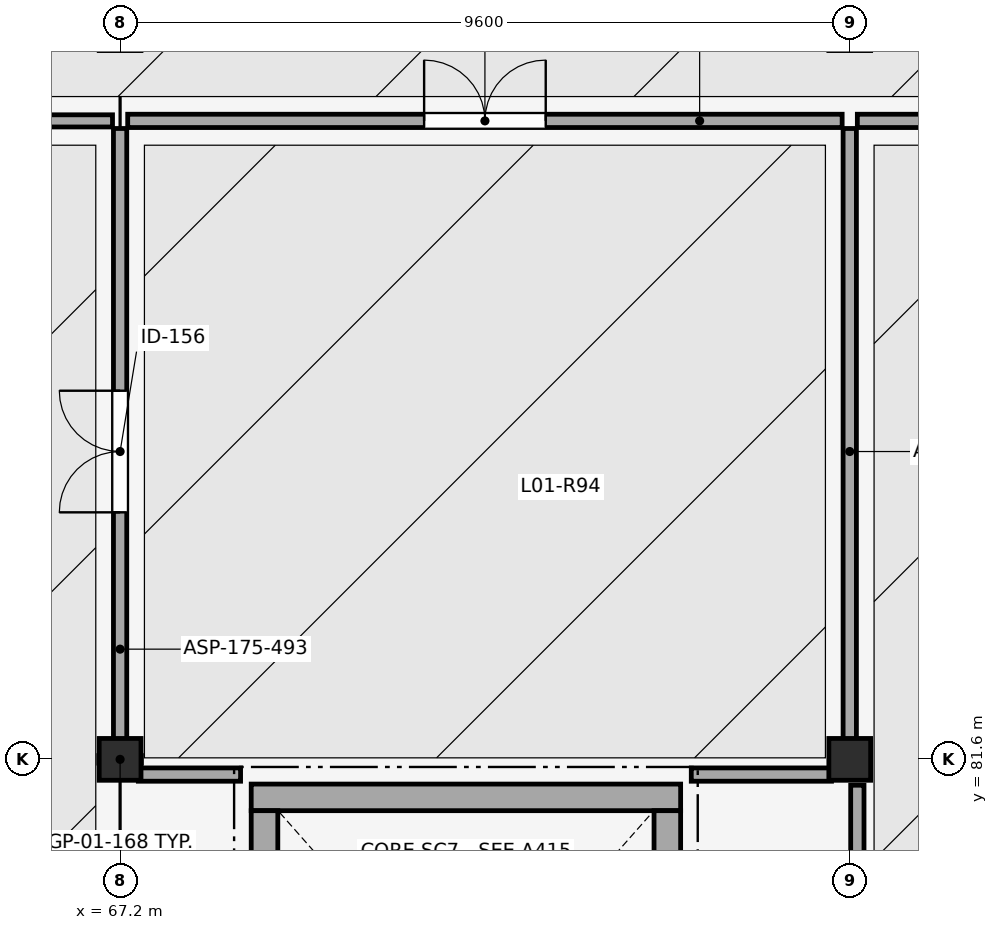
"""IFC4 building model, lengths in metres.
Left out: names, types, materials, properties, quantities, classifications, styles, units other than length and angle.
Written with IfcOpenShell. Run it as: python <this file> out.ifc"""

import sys

from ifc_helpers import new_model, si_unit, direction, frame, frame_2d, origin, origin_2d, place, context, subcontext, project, spatial, rectangle, extrude, element, fill, save


model = new_model("IFC4")
c1 = context("Model", 3, precision=1e-05, world=origin(), true_north=direction((0.0, 1.0)))
c2 = subcontext(c1, "Body", "Model", "MODEL_VIEW")
j1 = project(units=[si_unit("LENGTHUNIT", "METRE"), si_unit("PLANEANGLEUNIT", "RADIAN")], contexts=[c1])
p1 = place(None, origin())
s1 = spatial("IfcSite", under=j1, at=p1, CompositionType="ELEMENT")
p2 = place(p1, origin())
s2 = spatial("IfcBuilding", under=s1, at=p2, CompositionType="ELEMENT")
p3 = place(p2, frame((0.0, 0.0, 4.8)))
s3 = spatial("IfcBuildingStorey", under=s2, at=p3, CompositionType="ELEMENT", Elevation=4.8)
for number, where, z_axis, x_axis in (
    (1, (67.2, 81.6, 0.0), (0.0, 0.0, 1.0), (1.0, 0.0, 0.0)),
    (2, (76.8, 81.6, 0.0), (0.0, 0.0, 1.0), (1.0, 0.0, 0.0)),
):
    element("IfcColumn", number, at=place(p3, frame(where, z_axis=z_axis, x_axis=x_axis)), inside=s3, PredefinedType="COLUMN", context=c2, shape_type="SweptSolid", body=[
        extrude(rectangle(XDim=0.55, YDim=0.55, at=origin_2d()), origin(), (0.0, 0.0, 1.0), 4.8),
    ])
p4 = place(p3, frame((68.925, 81.1, 0.0), z_axis=(0.0, 0.0, 1.0), x_axis=(1.0, 0.0, 0.0)))
e3 = element("IfcWall", 3, at=p4, inside=s3, PredefinedType="SHEAR", context=c2, shape_type="SweptSolid", body=[
    extrude(rectangle(XDim=5.65, YDim=0.35, at=frame_2d((2.825, 0.0))), origin(), (0.0, 0.0, 1.0), 4.55),
])
p5 = place(p3, frame((69.1, 72.975, 0.0), z_axis=(0.0, 0.0, 1.0), x_axis=(0.0, 1.0, 0.0)))
e4 = element("IfcWall", 4, at=p5, inside=s3, PredefinedType="SHEAR", context=c2, shape_type="SweptSolid", body=[
    extrude(rectangle(XDim=7.95, YDim=0.35, at=frame_2d((3.975, 0.0))), origin(), (0.0, 0.0, 1.0), 4.55),
])
p6 = place(p3, frame((74.4, 80.925, 0.0), z_axis=(0.0, 0.0, 1.0), x_axis=(0.0, -1.0, 0.0)))
e5 = element("IfcWall", 5, at=p6, inside=s3, PredefinedType="SHEAR", context=c2, shape_type="SweptSolid", body=[
    extrude(rectangle(XDim=7.95, YDim=0.35, at=frame_2d((3.975, 0.0))), origin(), (0.0, 0.0, 1.0), 4.55),
])
p7 = place(p6, frame((5.68, 0.0, 0.0)))
e6 = element("IfcOpeningElement", 6, at=p7, cuts=e5, PredefinedType="OPENING", context=c2, shape_type="SweptSolid", body=[
    extrude(rectangle(XDim=2.05, YDim=2.15, at=frame_2d((1.025, 1.075))), frame((0.0, 0.185, 0.0), z_axis=(0.0, -1.0, 0.0), x_axis=(1.0, 0.0, 0.0)), (0.0, 0.0, 1.0), 0.37),
])
p8 = place(p3, frame((67.2, 81.4, 0.0), z_axis=(0.0, 0.0, 1.0), x_axis=(0.0, 1.0, 0.0)))
e7 = element("IfcWall", 7, at=p8, inside=s3, PredefinedType="PARTITIONING", context=c2, shape_type="SweptSolid", body=[
    extrude(rectangle(XDim=8.5, YDim=0.175, at=frame_2d((4.25, 0.0))), origin(), (0.0, 0.0, 1.0), 4.037),
])
p9 = place(p8, frame((3.45, 0.0, 0.0)))
e8 = element("IfcOpeningElement", 8, at=p9, cuts=e7, PredefinedType="OPENING", context=c2, shape_type="SweptSolid", body=[
    extrude(rectangle(XDim=1.6, YDim=2.15, at=frame_2d((0.8, 1.075))), frame((0.0, 0.097, 0.0), z_axis=(0.0, -1.0, 0.0), x_axis=(1.0, 0.0, 0.0)), (0.0, 0.0, 1.0), 0.195),
])
p10 = place(p3, frame((55.8, 90.0, 0.0), z_axis=(0.0, 0.0, 1.0), x_axis=(1.0, 0.0, 0.0)))
e9 = element("IfcWall", 9, at=p10, inside=s3, PredefinedType="PARTITIONING", context=c2, shape_type="SweptSolid", body=[
    extrude(rectangle(XDim=11.3, YDim=0.16, at=frame_2d((5.65, 0.0))), origin(), (0.0, 0.0, 1.0), 4.42),
])
p11 = place(p10, frame((4.75, 0.0, 0.0)))
e10 = element("IfcOpeningElement", 10, at=p11, cuts=e9, PredefinedType="OPENING", context=c2, shape_type="SweptSolid", body=[
    extrude(rectangle(XDim=1.8, YDim=2.15, at=frame_2d((0.9, 1.075))), frame((0.0, 0.09, 0.0), z_axis=(0.0, -1.0, 0.0), x_axis=(1.0, 0.0, 0.0)), (0.0, 0.0, 1.0), 0.18),
])
p12 = place(p3, frame((76.8, 81.4, 0.0), z_axis=(0.0, 0.0, 1.0), x_axis=(0.0, 1.0, 0.0)))
e11 = element("IfcWall", 11, at=p12, inside=s3, PredefinedType="PARTITIONING", context=c2, shape_type="SweptSolid", body=[
    extrude(rectangle(XDim=8.5, YDim=0.175, at=frame_2d((4.25, 0.0))), origin(), (0.0, 0.0, 1.0), 4.037),
])
p13 = place(p3, frame((67.3, 90.0, 0.0), z_axis=(0.0, 0.0, 1.0), x_axis=(1.0, 0.0, 0.0)))
e12 = element("IfcWall", 12, at=p13, inside=s3, PredefinedType="PARTITIONING", context=c2, shape_type="SweptSolid", body=[
    extrude(rectangle(XDim=9.4, YDim=0.175, at=frame_2d((4.7, 0.0))), origin(), (0.0, 0.0, 1.0), 4.42),
])
p14 = place(p13, frame((3.9, 0.0, 0.0)))
e13 = element("IfcOpeningElement", 13, at=p14, cuts=e12, PredefinedType="OPENING", context=c2, shape_type="SweptSolid", body=[
    extrude(rectangle(XDim=1.6, YDim=2.15, at=frame_2d((0.8, 1.075))), frame((0.0, 0.097, 0.0), z_axis=(0.0, -1.0, 0.0), x_axis=(1.0, 0.0, 0.0)), (0.0, 0.0, 1.0), 0.195),
])
p15 = place(p3, frame((76.9, 90.0, 0.0), z_axis=(0.0, 0.0, 1.0), x_axis=(1.0, 0.0, 0.0)))
e14 = element("IfcWall", 14, at=p15, inside=s3, PredefinedType="PARTITIONING", context=c2, shape_type="SweptSolid", body=[
    extrude(rectangle(XDim=19.05, YDim=0.175, at=frame_2d((9.525, 0.0))), origin(), (0.0, 0.0, 1.0), 4.42),
])
p16 = place(p15, frame((6.216, 0.0, 0.0)))
e15 = element("IfcOpeningElement", 15, at=p16, cuts=e14, PredefinedType="OPENING", context=c2, shape_type="SweptSolid", body=[
    extrude(rectangle(XDim=1.6, YDim=2.15, at=frame_2d((0.8, 1.075))), frame((0.0, 0.097, 0.0), z_axis=(0.0, -1.0, 0.0), x_axis=(1.0, 0.0, 0.0)), (0.0, 0.0, 1.0), 0.195),
])
p17 = place(p3, frame((67.44, 81.4, 0.0), z_axis=(0.0, 0.0, 1.0), x_axis=(1.0, 0.0, 0.0)))
e16 = element("IfcWall", 16, at=p17, inside=s3, PredefinedType="PARTITIONING", context=c2, shape_type="SweptSolid", body=[
    extrude(rectangle(XDim=1.345, YDim=0.175, at=frame_2d((0.672, 0.0))), origin(), (0.0, 0.0, 1.0), 3.895),
])
p18 = place(p3, frame((74.715, 81.4, 0.0), z_axis=(0.0, 0.0, 1.0), x_axis=(1.0, 0.0, 0.0)))
e17 = element("IfcWall", 17, at=p18, inside=s3, PredefinedType="PARTITIONING", context=c2, shape_type="SweptSolid", body=[
    extrude(rectangle(XDim=1.845, YDim=0.175, at=frame_2d((0.922, 0.0))), origin(), (0.0, 0.0, 1.0), 3.895),
])
p19 = place(p3, frame((76.9, 72.05, 0.0), z_axis=(0.0, 0.0, 1.0), x_axis=(0.0, 1.0, 0.0)))
e18 = element("IfcWall", 18, at=p19, inside=s3, PredefinedType="PARTITIONING", context=c2, shape_type="SweptSolid", body=[
    extrude(rectangle(XDim=9.21, YDim=0.175, at=frame_2d((4.605, 0.0))), origin(), (0.0, 0.0, 1.0), 4.037),
])
p20 = place(p9, origin())
e19 = element("IfcDoor", 19, at=p20, inside=s3, OperationType="DOUBLE_DOOR_SINGLE_SWING", PredefinedType="DOOR", context=c2, shape_type="SweptSolid", body=[
    extrude(rectangle(XDim=1.6, YDim=2.15, at=frame_2d((0.8, 1.075))), frame((0.0, 0.025, 0.0), z_axis=(0.0, -1.0, 0.0), x_axis=(1.0, 0.0, 0.0)), (0.0, 0.0, 1.0), 0.05),
])
fill(e8, e19)
p21 = place(p14, origin())
e20 = element("IfcDoor", 20, at=p21, inside=s3, OperationType="DOUBLE_DOOR_SINGLE_SWING", PredefinedType="DOOR", context=c2, shape_type="SweptSolid", body=[
    extrude(rectangle(XDim=1.6, YDim=2.15, at=frame_2d((0.8, 1.075))), frame((0.0, 0.025, 0.0), z_axis=(0.0, -1.0, 0.0), x_axis=(1.0, 0.0, 0.0)), (0.0, 0.0, 1.0), 0.05),
])
fill(e13, e20)
save(model, sys.argv[1])
